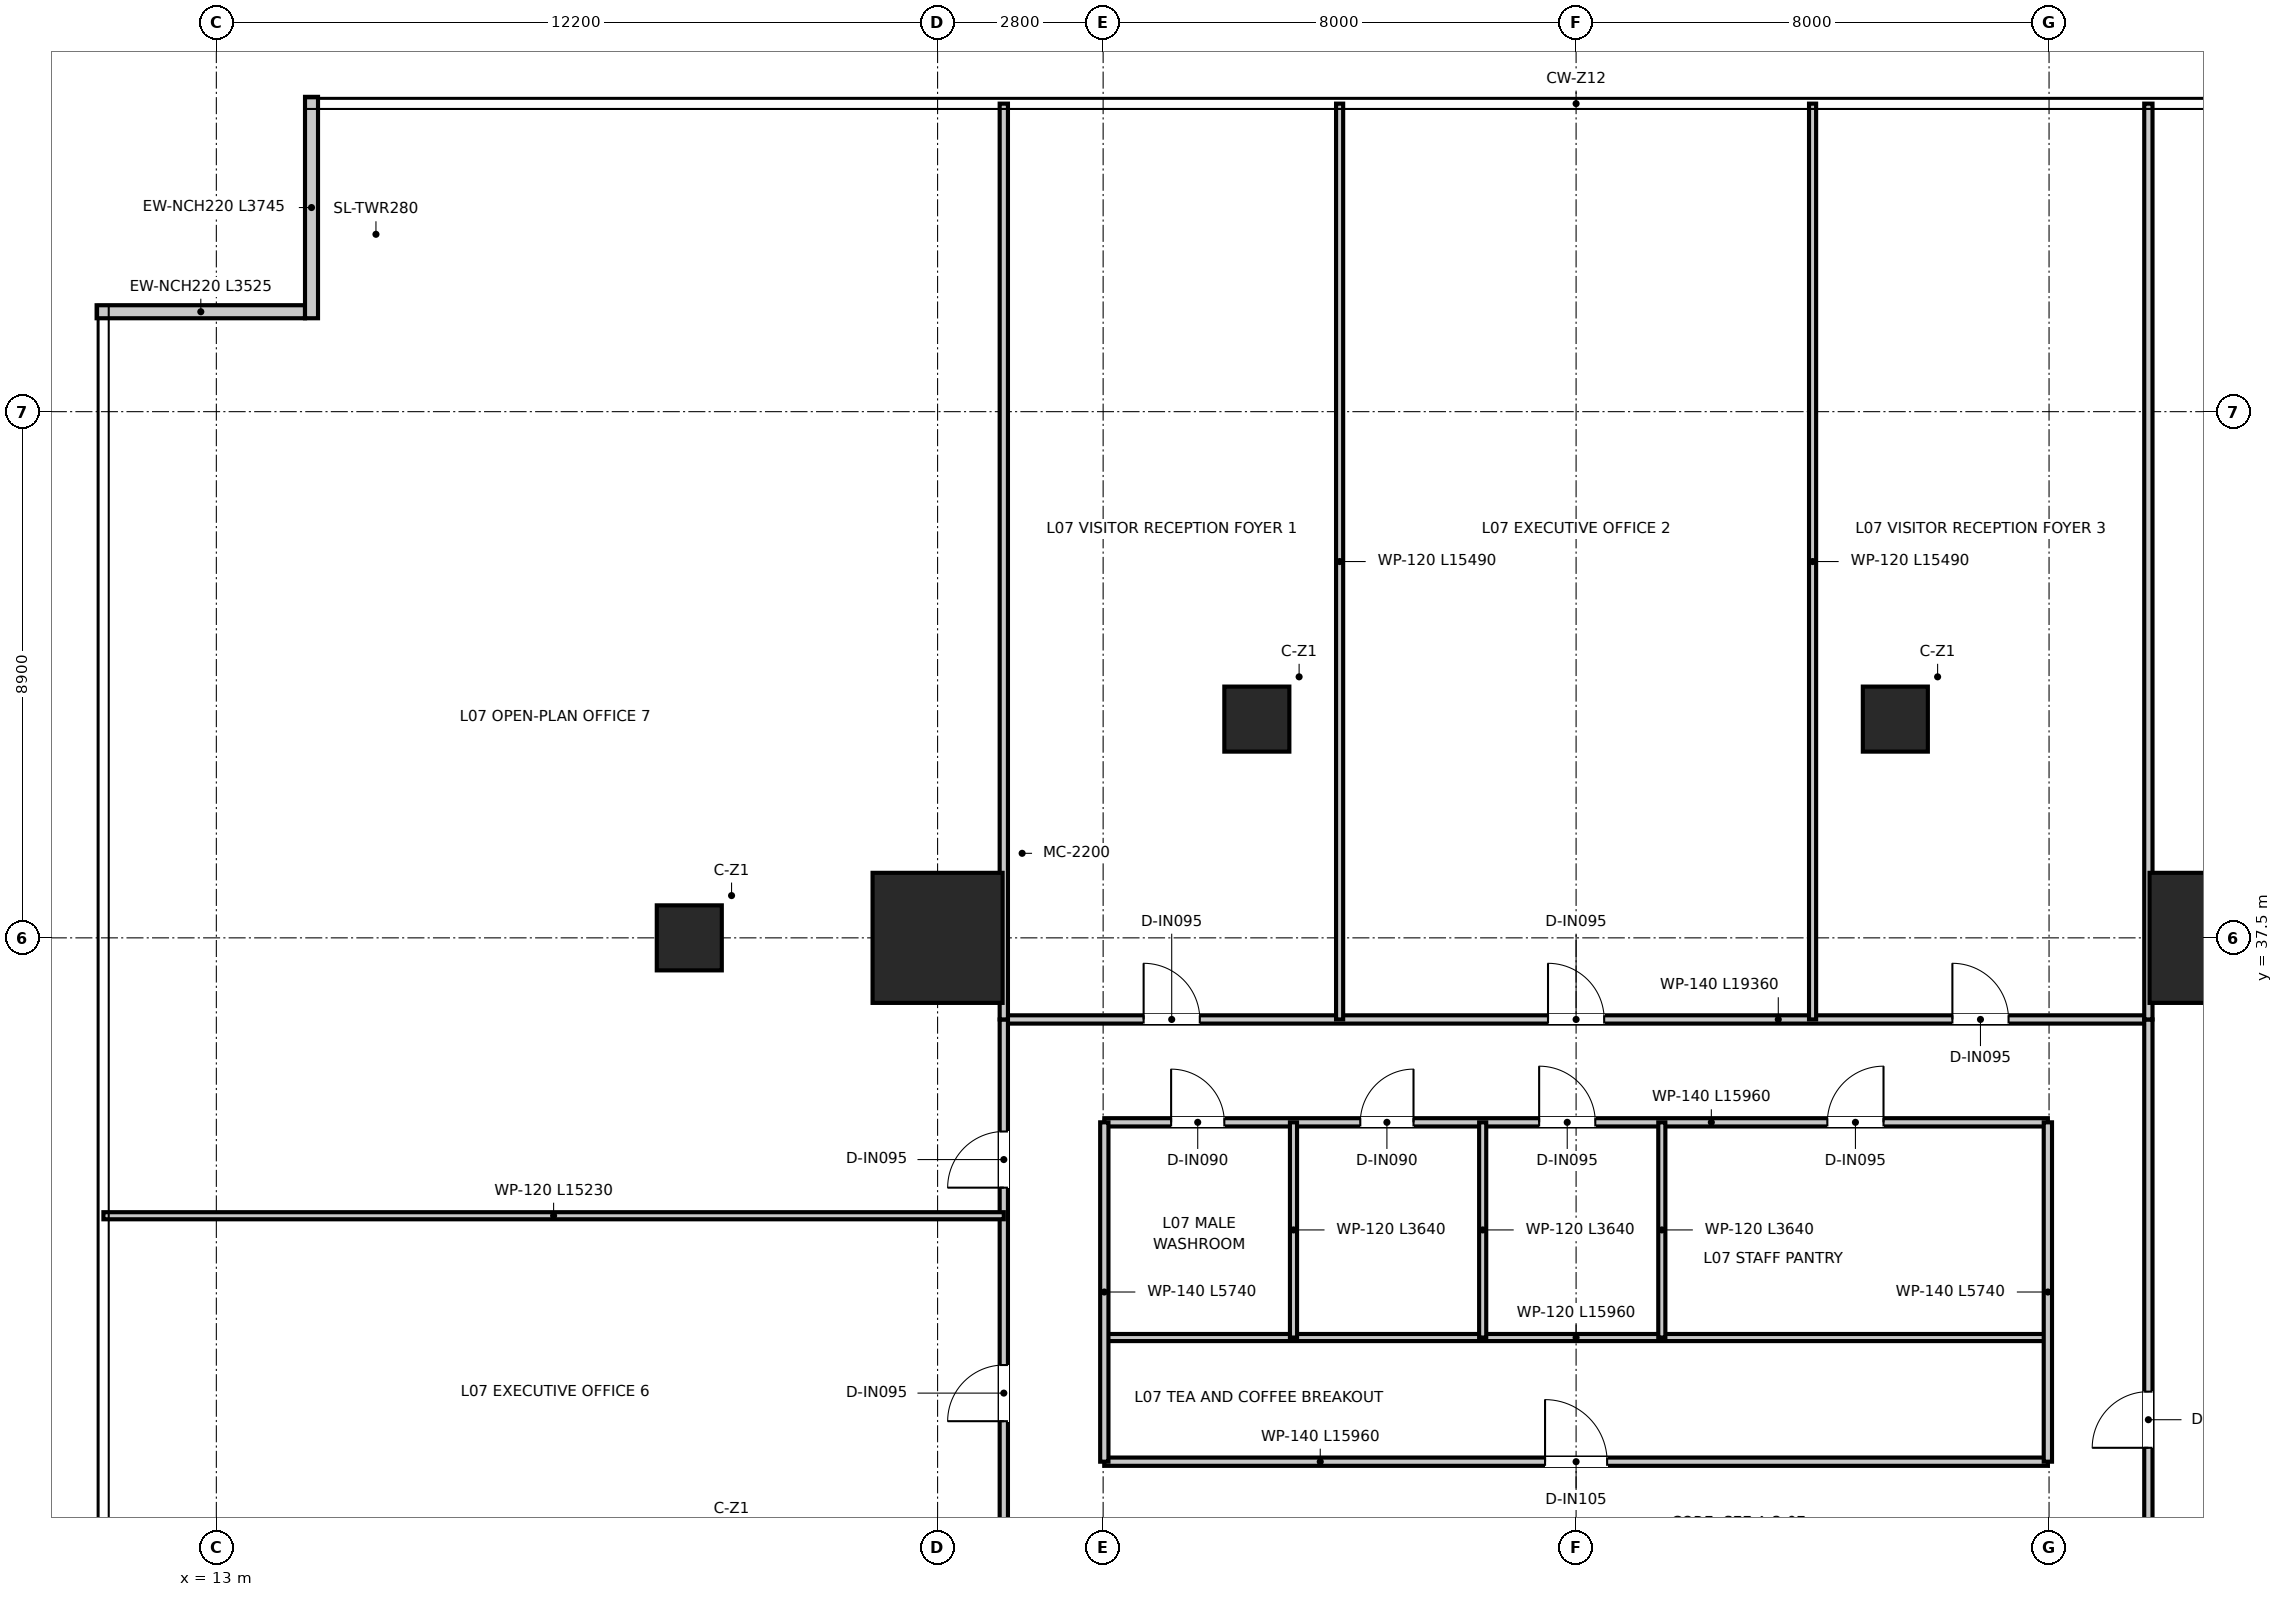
"""IFC4 building model, lengths in metres.
Left out: names, types, materials, properties, quantities, classifications, styles, units other than length and angle.
Written with IfcOpenShell. Run it as: python <this file> out.ifc"""

import sys

from ifc_helpers import new_model, si_unit, direction, frame, frame_2d, origin, origin_2d, place, context, subcontext, project, spatial, rectangle, extrude, source, transform, mapped, element, fill, save


model = new_model("IFC4")
c1 = context("Model", 3, precision=1e-05, world=origin(), true_north=direction((0.0, 1.0)))
c2 = subcontext(c1, "Body", "Model", "MODEL_VIEW")
j1 = project(units=[si_unit("LENGTHUNIT", "METRE"), si_unit("PLANEANGLEUNIT", "RADIAN")], contexts=[c1])
p1 = place(None, origin())
s1 = spatial("IfcSite", under=j1, at=p1, CompositionType="ELEMENT")
p2 = place(p1, origin())
s2 = spatial("IfcBuilding", under=s1, at=p2, CompositionType="ELEMENT")
p3 = place(p2, frame((0.0, 0.0, 32.9)))
s3 = spatial("IfcBuildingStorey", under=s2, at=p3, CompositionType="ELEMENT", Elevation=32.9)
m1 = source(origin(), c2, "Body", "SweptSolid", [
    extrude(rectangle(XDim=2.2, YDim=2.2, at=origin_2d()), origin(), (0.0, 0.0, 1.0), 3.95),
])
for number, where, z_axis, x_axis in (
    (1, (46.8, 37.5, 0.0), (0.0, 0.0, 1.0), (1.0, 0.0, 0.0)),
    (2, (25.2, 37.5, 0.0), (0.0, 0.0, 1.0), (1.0, 0.0, 0.0)),
):
    element("IfcColumn", number, at=place(p3, frame(where, z_axis=z_axis, x_axis=x_axis)), inside=s3, PredefinedType="USERDEFINED", context=c2, shape_type="MappedRepresentation", body=[
        mapped(m1, transform((0.0, 0.0, 0.0), x_axis=(1.0, 0.0, 0.0), y_axis=(0.0, 1.0, 0.0), z_axis=(0.0, 0.0, 1.0), scale=1.0)),
    ])
m2 = source(origin(), c2, "Body", "SweptSolid", [
    extrude(rectangle(XDim=1.1, YDim=1.1, at=origin_2d()), origin(), (0.0, 0.0, 1.0), 3.95),
])
for number, where, z_axis, x_axis in (
    (3, (21.0, 37.5, 0.0), (0.0, 0.0, 1.0), (1.0, 0.0, 0.0)),
    (4, (30.6, 41.2, 0.0), (0.0, 0.0, 1.0), (1.0, 0.0, 0.0)),
    (5, (41.4, 41.2, 0.0), (0.0, 0.0, 1.0), (1.0, 0.0, 0.0)),
):
    element("IfcColumn", number, at=place(p3, frame(where, z_axis=z_axis, x_axis=x_axis)), inside=s3, PredefinedType="COLUMN", context=c2, shape_type="MappedRepresentation", body=[
        mapped(m2, transform((0.0, 0.0, 0.0), x_axis=(1.0, 0.0, 0.0), y_axis=(0.0, 1.0, 0.0), z_axis=(0.0, 0.0, 1.0), scale=1.0)),
    ])
p4 = place(p3, frame((14.5, 48.09, 0.0), z_axis=(0.0, 0.0, 1.0), x_axis=(-1.0, 0.0, 0.0)))
e6 = element("IfcWall", 6, at=p4, inside=s3, PredefinedType="ELEMENTEDWALL", context=c2, shape_type="SweptSolid", body=[
    extrude(rectangle(XDim=3.525, YDim=0.22, at=frame_2d((1.762, 0.0))), origin(), (0.0, 0.0, 1.0), 3.67),
])
p5 = place(p3, frame((14.61, 51.725, 0.0), z_axis=(0.0, 0.0, 1.0), x_axis=(0.0, -1.0, 0.0)))
e7 = element("IfcWall", 7, at=p5, inside=s3, PredefinedType="ELEMENTEDWALL", context=c2, shape_type="SweptSolid", body=[
    extrude(rectangle(XDim=3.745, YDim=0.22, at=frame_2d((1.873, 0.0))), origin(), (0.0, 0.0, 1.0), 3.67),
])
p6 = place(p3, frame((28.02, 28.64, 0.0), z_axis=(0.0, 0.0, 1.0), x_axis=(1.0, 0.0, 0.0)))
e8 = element("IfcWall", 8, at=p6, inside=s3, PredefinedType="PARTITIONING", context=c2, shape_type="SweptSolid", body=[
    extrude(rectangle(XDim=15.96, YDim=0.14, at=frame_2d((7.98, 0.0))), origin(), (0.0, 0.0, 1.0), 3.08),
])
p7 = place(p6, frame((7.455, 0.0, 0.0)))
e9 = element("IfcOpeningElement", 9, at=p7, cuts=e8, PredefinedType="OPENING", context=c2, shape_type="SweptSolid", body=[
    extrude(rectangle(XDim=1.05, YDim=2.15, at=frame_2d((0.525, 1.075))), frame((0.0, 0.08, 0.0), z_axis=(0.0, -1.0, 0.0), x_axis=(1.0, 0.0, 0.0)), (0.0, 0.0, 1.0), 0.16),
])
p8 = place(p3, frame((28.02, 30.74, 0.0), z_axis=(0.0, 0.0, 1.0), x_axis=(1.0, 0.0, 0.0)))
e10 = element("IfcWall", 10, at=p8, inside=s3, PredefinedType="PARTITIONING", context=c2, shape_type="SweptSolid", body=[
    extrude(rectangle(XDim=15.96, YDim=0.12, at=frame_2d((7.98, 0.0))), origin(), (0.0, 0.0, 1.0), 3.08),
])
p9 = place(p3, frame((28.02, 34.38, 0.0), z_axis=(0.0, 0.0, 1.0), x_axis=(1.0, 0.0, 0.0)))
e11 = element("IfcWall", 11, at=p9, inside=s3, PredefinedType="PARTITIONING", context=c2, shape_type="SweptSolid", body=[
    extrude(rectangle(XDim=15.96, YDim=0.14, at=frame_2d((7.98, 0.0))), origin(), (0.0, 0.0, 1.0), 3.08),
])
p10 = place(p9, frame((1.13, 0.0, 0.0)))
e12 = element("IfcOpeningElement", 12, at=p10, cuts=e11, PredefinedType="OPENING", context=c2, shape_type="SweptSolid", body=[
    extrude(rectangle(XDim=0.9, YDim=2.1, at=frame_2d((0.45, 1.05))), frame((0.0, 0.08, 0.0), z_axis=(0.0, -1.0, 0.0), x_axis=(1.0, 0.0, 0.0)), (0.0, 0.0, 1.0), 0.16),
])
p11 = place(p9, frame((4.33, 0.0, 0.0)))
e13 = element("IfcOpeningElement", 13, at=p11, cuts=e11, PredefinedType="OPENING", context=c2, shape_type="SweptSolid", body=[
    extrude(rectangle(XDim=0.9, YDim=2.1, at=frame_2d((0.45, 1.05))), frame((0.0, 0.08, 0.0), z_axis=(0.0, -1.0, 0.0), x_axis=(1.0, 0.0, 0.0)), (0.0, 0.0, 1.0), 0.16),
])
p12 = place(p9, frame((7.355, 0.0, 0.0)))
e14 = element("IfcOpeningElement", 14, at=p12, cuts=e11, PredefinedType="OPENING", context=c2, shape_type="SweptSolid", body=[
    extrude(rectangle(XDim=0.95, YDim=2.1, at=frame_2d((0.475, 1.05))), frame((0.0, 0.08, 0.0), z_axis=(0.0, -1.0, 0.0), x_axis=(1.0, 0.0, 0.0)), (0.0, 0.0, 1.0), 0.16),
])
p13 = place(p9, frame((12.23, 0.0, 0.0)))
e15 = element("IfcOpeningElement", 15, at=p13, cuts=e11, PredefinedType="OPENING", context=c2, shape_type="SweptSolid", body=[
    extrude(rectangle(XDim=0.95, YDim=2.1, at=frame_2d((0.475, 1.05))), frame((0.0, 0.08, 0.0), z_axis=(0.0, -1.0, 0.0), x_axis=(1.0, 0.0, 0.0)), (0.0, 0.0, 1.0), 0.16),
])
for number, where, z_axis, x_axis in (
    (16, (28.02, 28.64, 0.0), (0.0, 0.0, 1.0), (0.0, 1.0, 0.0)),
    (17, (43.98, 28.64, 0.0), (0.0, 0.0, 1.0), (0.0, 1.0, 0.0)),
):
    element("IfcWall", number, at=place(p3, frame(where, z_axis=z_axis, x_axis=x_axis)), inside=s3, PredefinedType="PARTITIONING", context=c2, shape_type="SweptSolid", body=[
        extrude(rectangle(XDim=5.74, YDim=0.14, at=frame_2d((2.87, 0.0))), origin(), (0.0, 0.0, 1.0), 3.22),
    ])
for number, where, z_axis, x_axis in (
    (18, (31.22, 30.74, 0.0), (0.0, 0.0, 1.0), (0.0, 1.0, 0.0)),
    (19, (34.42, 30.74, 0.0), (0.0, 0.0, 1.0), (0.0, 1.0, 0.0)),
    (20, (37.45, 30.74, 0.0), (0.0, 0.0, 1.0), (0.0, 1.0, 0.0)),
):
    element("IfcWall", number, at=place(p3, frame(where, z_axis=z_axis, x_axis=x_axis)), inside=s3, PredefinedType="PARTITIONING", context=c2, shape_type="SweptSolid", body=[
        extrude(rectangle(XDim=3.64, YDim=0.12, at=frame_2d((1.82, 0.0))), origin(), (0.0, 0.0, 1.0), 3.12),
    ])
p14 = place(p3, frame((26.32, 36.12, 0.0), z_axis=(0.0, 0.0, 1.0), x_axis=(1.0, 0.0, 0.0)))
e21 = element("IfcWall", 21, at=p14, inside=s3, PredefinedType="PARTITIONING", context=c2, shape_type="SweptSolid", body=[
    extrude(rectangle(XDim=19.36, YDim=0.14, at=frame_2d((9.68, 0.0))), origin(), (0.0, 0.0, 1.0), 3.08),
])
p15 = place(p14, frame((2.365, 0.0, 0.0)))
e22 = element("IfcOpeningElement", 22, at=p15, cuts=e21, PredefinedType="OPENING", context=c2, shape_type="SweptSolid", body=[
    extrude(rectangle(XDim=0.95, YDim=2.1, at=frame_2d((0.475, 1.05))), frame((0.0, 0.08, 0.0), z_axis=(0.0, -1.0, 0.0), x_axis=(1.0, 0.0, 0.0)), (0.0, 0.0, 1.0), 0.16),
])
p16 = place(p14, frame((9.205, 0.0, 0.0)))
e23 = element("IfcOpeningElement", 23, at=p16, cuts=e21, PredefinedType="OPENING", context=c2, shape_type="SweptSolid", body=[
    extrude(rectangle(XDim=0.95, YDim=2.1, at=frame_2d((0.475, 1.05))), frame((0.0, 0.08, 0.0), z_axis=(0.0, -1.0, 0.0), x_axis=(1.0, 0.0, 0.0)), (0.0, 0.0, 1.0), 0.16),
])
p17 = place(p14, frame((16.045, 0.0, 0.0)))
e24 = element("IfcOpeningElement", 24, at=p17, cuts=e21, PredefinedType="OPENING", context=c2, shape_type="SweptSolid", body=[
    extrude(rectangle(XDim=0.95, YDim=2.1, at=frame_2d((0.475, 1.05))), frame((0.0, 0.08, 0.0), z_axis=(0.0, -1.0, 0.0), x_axis=(1.0, 0.0, 0.0)), (0.0, 0.0, 1.0), 0.16),
])
p18 = place(p3, frame((26.32, 10.5, 0.0), z_axis=(0.0, 0.0, 1.0), x_axis=(0.0, 1.0, 0.0)))
e25 = element("IfcWall", 25, at=p18, inside=s3, PredefinedType="PARTITIONING", context=c2, shape_type="SweptSolid", body=[
    extrude(rectangle(XDim=25.62, YDim=0.14, at=frame_2d((12.81, 0.0))), origin(), (0.0, 0.0, 1.0), 2.97),
])
p19 = place(p18, frame((7.775, 0.0, 0.0)))
e26 = element("IfcOpeningElement", 26, at=p19, cuts=e25, PredefinedType="OPENING", context=c2, shape_type="SweptSolid", body=[
    extrude(rectangle(XDim=0.95, YDim=2.1, at=frame_2d((0.475, 1.05))), frame((0.0, 0.08, 0.0), z_axis=(0.0, -1.0, 0.0), x_axis=(1.0, 0.0, 0.0)), (0.0, 0.0, 1.0), 0.16),
])
p20 = place(p18, frame((12.425, 0.0, 0.0)))
e27 = element("IfcOpeningElement", 27, at=p20, cuts=e25, PredefinedType="OPENING", context=c2, shape_type="SweptSolid", body=[
    extrude(rectangle(XDim=0.95, YDim=2.1, at=frame_2d((0.475, 1.05))), frame((0.0, 0.08, 0.0), z_axis=(0.0, -1.0, 0.0), x_axis=(1.0, 0.0, 0.0)), (0.0, 0.0, 1.0), 0.16),
])
p21 = place(p18, frame((18.825, 0.0, 0.0)))
e28 = element("IfcOpeningElement", 28, at=p21, cuts=e25, PredefinedType="OPENING", context=c2, shape_type="SweptSolid", body=[
    extrude(rectangle(XDim=0.95, YDim=2.1, at=frame_2d((0.475, 1.05))), frame((0.0, 0.08, 0.0), z_axis=(0.0, -1.0, 0.0), x_axis=(1.0, 0.0, 0.0)), (0.0, 0.0, 1.0), 0.16),
])
p22 = place(p18, frame((22.775, 0.0, 0.0)))
e29 = element("IfcOpeningElement", 29, at=p22, cuts=e25, PredefinedType="OPENING", context=c2, shape_type="SweptSolid", body=[
    extrude(rectangle(XDim=0.95, YDim=2.1, at=frame_2d((0.475, 1.05))), frame((0.0, 0.08, 0.0), z_axis=(0.0, -1.0, 0.0), x_axis=(1.0, 0.0, 0.0)), (0.0, 0.0, 1.0), 0.16),
])
p23 = place(p3, frame((45.68, 10.5, 0.0), z_axis=(0.0, 0.0, 1.0), x_axis=(0.0, 1.0, 0.0)))
e30 = element("IfcWall", 30, at=p23, inside=s3, PredefinedType="PARTITIONING", context=c2, shape_type="SweptSolid", body=[
    extrude(rectangle(XDim=25.62, YDim=0.14, at=frame_2d((12.81, 0.0))), origin(), (0.0, 0.0, 1.0), 2.97),
])
p24 = place(p23, frame((9.775, 0.0, 0.0)))
e31 = element("IfcOpeningElement", 31, at=p24, cuts=e30, PredefinedType="OPENING", context=c2, shape_type="SweptSolid", body=[
    extrude(rectangle(XDim=0.95, YDim=2.1, at=frame_2d((0.475, 1.05))), frame((0.0, 0.08, 0.0), z_axis=(0.0, -1.0, 0.0), x_axis=(1.0, 0.0, 0.0)), (0.0, 0.0, 1.0), 0.16),
])
p25 = place(p23, frame((18.375, 0.0, 0.0)))
e32 = element("IfcOpeningElement", 32, at=p25, cuts=e30, PredefinedType="OPENING", context=c2, shape_type="SweptSolid", body=[
    extrude(rectangle(XDim=0.95, YDim=2.1, at=frame_2d((0.475, 1.05))), frame((0.0, 0.08, 0.0), z_axis=(0.0, -1.0, 0.0), x_axis=(1.0, 0.0, 0.0)), (0.0, 0.0, 1.0), 0.16),
])
for number, where, z_axis, x_axis in (
    (33, (26.32, 36.12, 0.0), (0.0, 0.0, 1.0), (0.0, 1.0, 0.0)),
    (34, (45.68, 36.12, 0.0), (0.0, 0.0, 1.0), (0.0, 1.0, 0.0)),
):
    element("IfcWall", number, at=place(p3, frame(where, z_axis=z_axis, x_axis=x_axis)), inside=s3, PredefinedType="PARTITIONING", context=c2, shape_type="SweptSolid", body=[
        extrude(rectangle(XDim=15.49, YDim=0.14, at=frame_2d((7.745, 0.0))), origin(), (0.0, 0.0, 1.0), 2.97),
    ])
for number, where, z_axis, x_axis in (
    (35, (32.0, 36.12, 0.0), (0.0, 0.0, 1.0), (0.0, 1.0, 0.0)),
    (36, (40.0, 36.12, 0.0), (0.0, 0.0, 1.0), (0.0, 1.0, 0.0)),
):
    element("IfcWall", number, at=place(p3, frame(where, z_axis=z_axis, x_axis=x_axis)), inside=s3, PredefinedType="PARTITIONING", context=c2, shape_type="SweptSolid", body=[
        extrude(rectangle(XDim=15.49, YDim=0.12, at=frame_2d((7.745, 0.0))), origin(), (0.0, 0.0, 1.0), 2.97),
    ])
p26 = place(p3, frame((11.09, 32.8, 0.0), z_axis=(0.0, 0.0, 1.0), x_axis=(1.0, 0.0, 0.0)))
e37 = element("IfcWall", 37, at=p26, inside=s3, PredefinedType="PARTITIONING", context=c2, shape_type="SweptSolid", body=[
    extrude(rectangle(XDim=15.23, YDim=0.12, at=frame_2d((7.615, 0.0))), origin(), (0.0, 0.0, 1.0), 2.97),
])
p27 = place(p7, origin())
e38 = element("IfcDoor", 38, at=p27, inside=s3, OperationType="SINGLE_SWING_LEFT", PredefinedType="DOOR", context=c2, shape_type="SweptSolid", body=[
    extrude(rectangle(XDim=1.05, YDim=2.15, at=frame_2d((0.525, 1.075))), frame((0.0, 0.025, 0.0), z_axis=(0.0, -1.0, 0.0), x_axis=(1.0, 0.0, 0.0)), (0.0, 0.0, 1.0), 0.05),
])
fill(e9, e38)
p28 = place(p10, origin())
e39 = element("IfcDoor", 39, at=p28, inside=s3, OperationType="SINGLE_SWING_LEFT", PredefinedType="DOOR", context=c2, shape_type="SweptSolid", body=[
    extrude(rectangle(XDim=0.9, YDim=2.1, at=frame_2d((0.45, 1.05))), frame((0.0, 0.025, 0.0), z_axis=(0.0, -1.0, 0.0), x_axis=(1.0, 0.0, 0.0)), (0.0, 0.0, 1.0), 0.05),
])
fill(e12, e39)
p29 = place(p11, origin())
e40 = element("IfcDoor", 40, at=p29, inside=s3, OperationType="SINGLE_SWING_RIGHT", PredefinedType="DOOR", context=c2, shape_type="SweptSolid", body=[
    extrude(rectangle(XDim=0.9, YDim=2.1, at=frame_2d((0.45, 1.05))), frame((0.0, 0.025, 0.0), z_axis=(0.0, -1.0, 0.0), x_axis=(1.0, 0.0, 0.0)), (0.0, 0.0, 1.0), 0.05),
])
fill(e13, e40)
p30 = place(p12, origin())
e41 = element("IfcDoor", 41, at=p30, inside=s3, OperationType="SINGLE_SWING_LEFT", PredefinedType="DOOR", context=c2, shape_type="SweptSolid", body=[
    extrude(rectangle(XDim=0.95, YDim=2.1, at=frame_2d((0.475, 1.05))), frame((0.0, 0.025, 0.0), z_axis=(0.0, -1.0, 0.0), x_axis=(1.0, 0.0, 0.0)), (0.0, 0.0, 1.0), 0.05),
])
fill(e14, e41)
p31 = place(p13, origin())
e42 = element("IfcDoor", 42, at=p31, inside=s3, OperationType="SINGLE_SWING_RIGHT", PredefinedType="DOOR", context=c2, shape_type="SweptSolid", body=[
    extrude(rectangle(XDim=0.95, YDim=2.1, at=frame_2d((0.475, 1.05))), frame((0.0, 0.025, 0.0), z_axis=(0.0, -1.0, 0.0), x_axis=(1.0, 0.0, 0.0)), (0.0, 0.0, 1.0), 0.05),
])
fill(e15, e42)
p32 = place(p15, origin())
e43 = element("IfcDoor", 43, at=p32, inside=s3, OperationType="SINGLE_SWING_LEFT", PredefinedType="DOOR", context=c2, shape_type="SweptSolid", body=[
    extrude(rectangle(XDim=0.95, YDim=2.1, at=frame_2d((0.475, 1.05))), frame((0.0, 0.025, 0.0), z_axis=(0.0, -1.0, 0.0), x_axis=(1.0, 0.0, 0.0)), (0.0, 0.0, 1.0), 0.05),
])
fill(e22, e43)
p33 = place(p16, origin())
e44 = element("IfcDoor", 44, at=p33, inside=s3, OperationType="SINGLE_SWING_LEFT", PredefinedType="DOOR", context=c2, shape_type="SweptSolid", body=[
    extrude(rectangle(XDim=0.95, YDim=2.1, at=frame_2d((0.475, 1.05))), frame((0.0, 0.025, 0.0), z_axis=(0.0, -1.0, 0.0), x_axis=(1.0, 0.0, 0.0)), (0.0, 0.0, 1.0), 0.05),
])
fill(e23, e44)
p34 = place(p17, origin())
e45 = element("IfcDoor", 45, at=p34, inside=s3, OperationType="SINGLE_SWING_LEFT", PredefinedType="DOOR", context=c2, shape_type="SweptSolid", body=[
    extrude(rectangle(XDim=0.95, YDim=2.1, at=frame_2d((0.475, 1.05))), frame((0.0, 0.025, 0.0), z_axis=(0.0, -1.0, 0.0), x_axis=(1.0, 0.0, 0.0)), (0.0, 0.0, 1.0), 0.05),
])
fill(e24, e45)
p35 = place(p21, origin())
e46 = element("IfcDoor", 46, at=p35, inside=s3, OperationType="SINGLE_SWING_LEFT", PredefinedType="DOOR", context=c2, shape_type="SweptSolid", body=[
    extrude(rectangle(XDim=0.95, YDim=2.1, at=frame_2d((0.475, 1.05))), frame((0.0, 0.025, 0.0), z_axis=(0.0, -1.0, 0.0), x_axis=(1.0, 0.0, 0.0)), (0.0, 0.0, 1.0), 0.05),
])
fill(e28, e46)
p36 = place(p22, origin())
e47 = element("IfcDoor", 47, at=p36, inside=s3, OperationType="SINGLE_SWING_LEFT", PredefinedType="DOOR", context=c2, shape_type="SweptSolid", body=[
    extrude(rectangle(XDim=0.95, YDim=2.1, at=frame_2d((0.475, 1.05))), frame((0.0, 0.025, 0.0), z_axis=(0.0, -1.0, 0.0), x_axis=(1.0, 0.0, 0.0)), (0.0, 0.0, 1.0), 0.05),
])
fill(e29, e47)
p37 = place(p25, origin())
e48 = element("IfcDoor", 48, at=p37, inside=s3, OperationType="SINGLE_SWING_LEFT", PredefinedType="DOOR", context=c2, shape_type="SweptSolid", body=[
    extrude(rectangle(XDim=0.95, YDim=2.1, at=frame_2d((0.475, 1.05))), frame((0.0, 0.025, 0.0), z_axis=(0.0, -1.0, 0.0), x_axis=(1.0, 0.0, 0.0)), (0.0, 0.0, 1.0), 0.05),
])
fill(e32, e48)
save(model, sys.argv[1])
